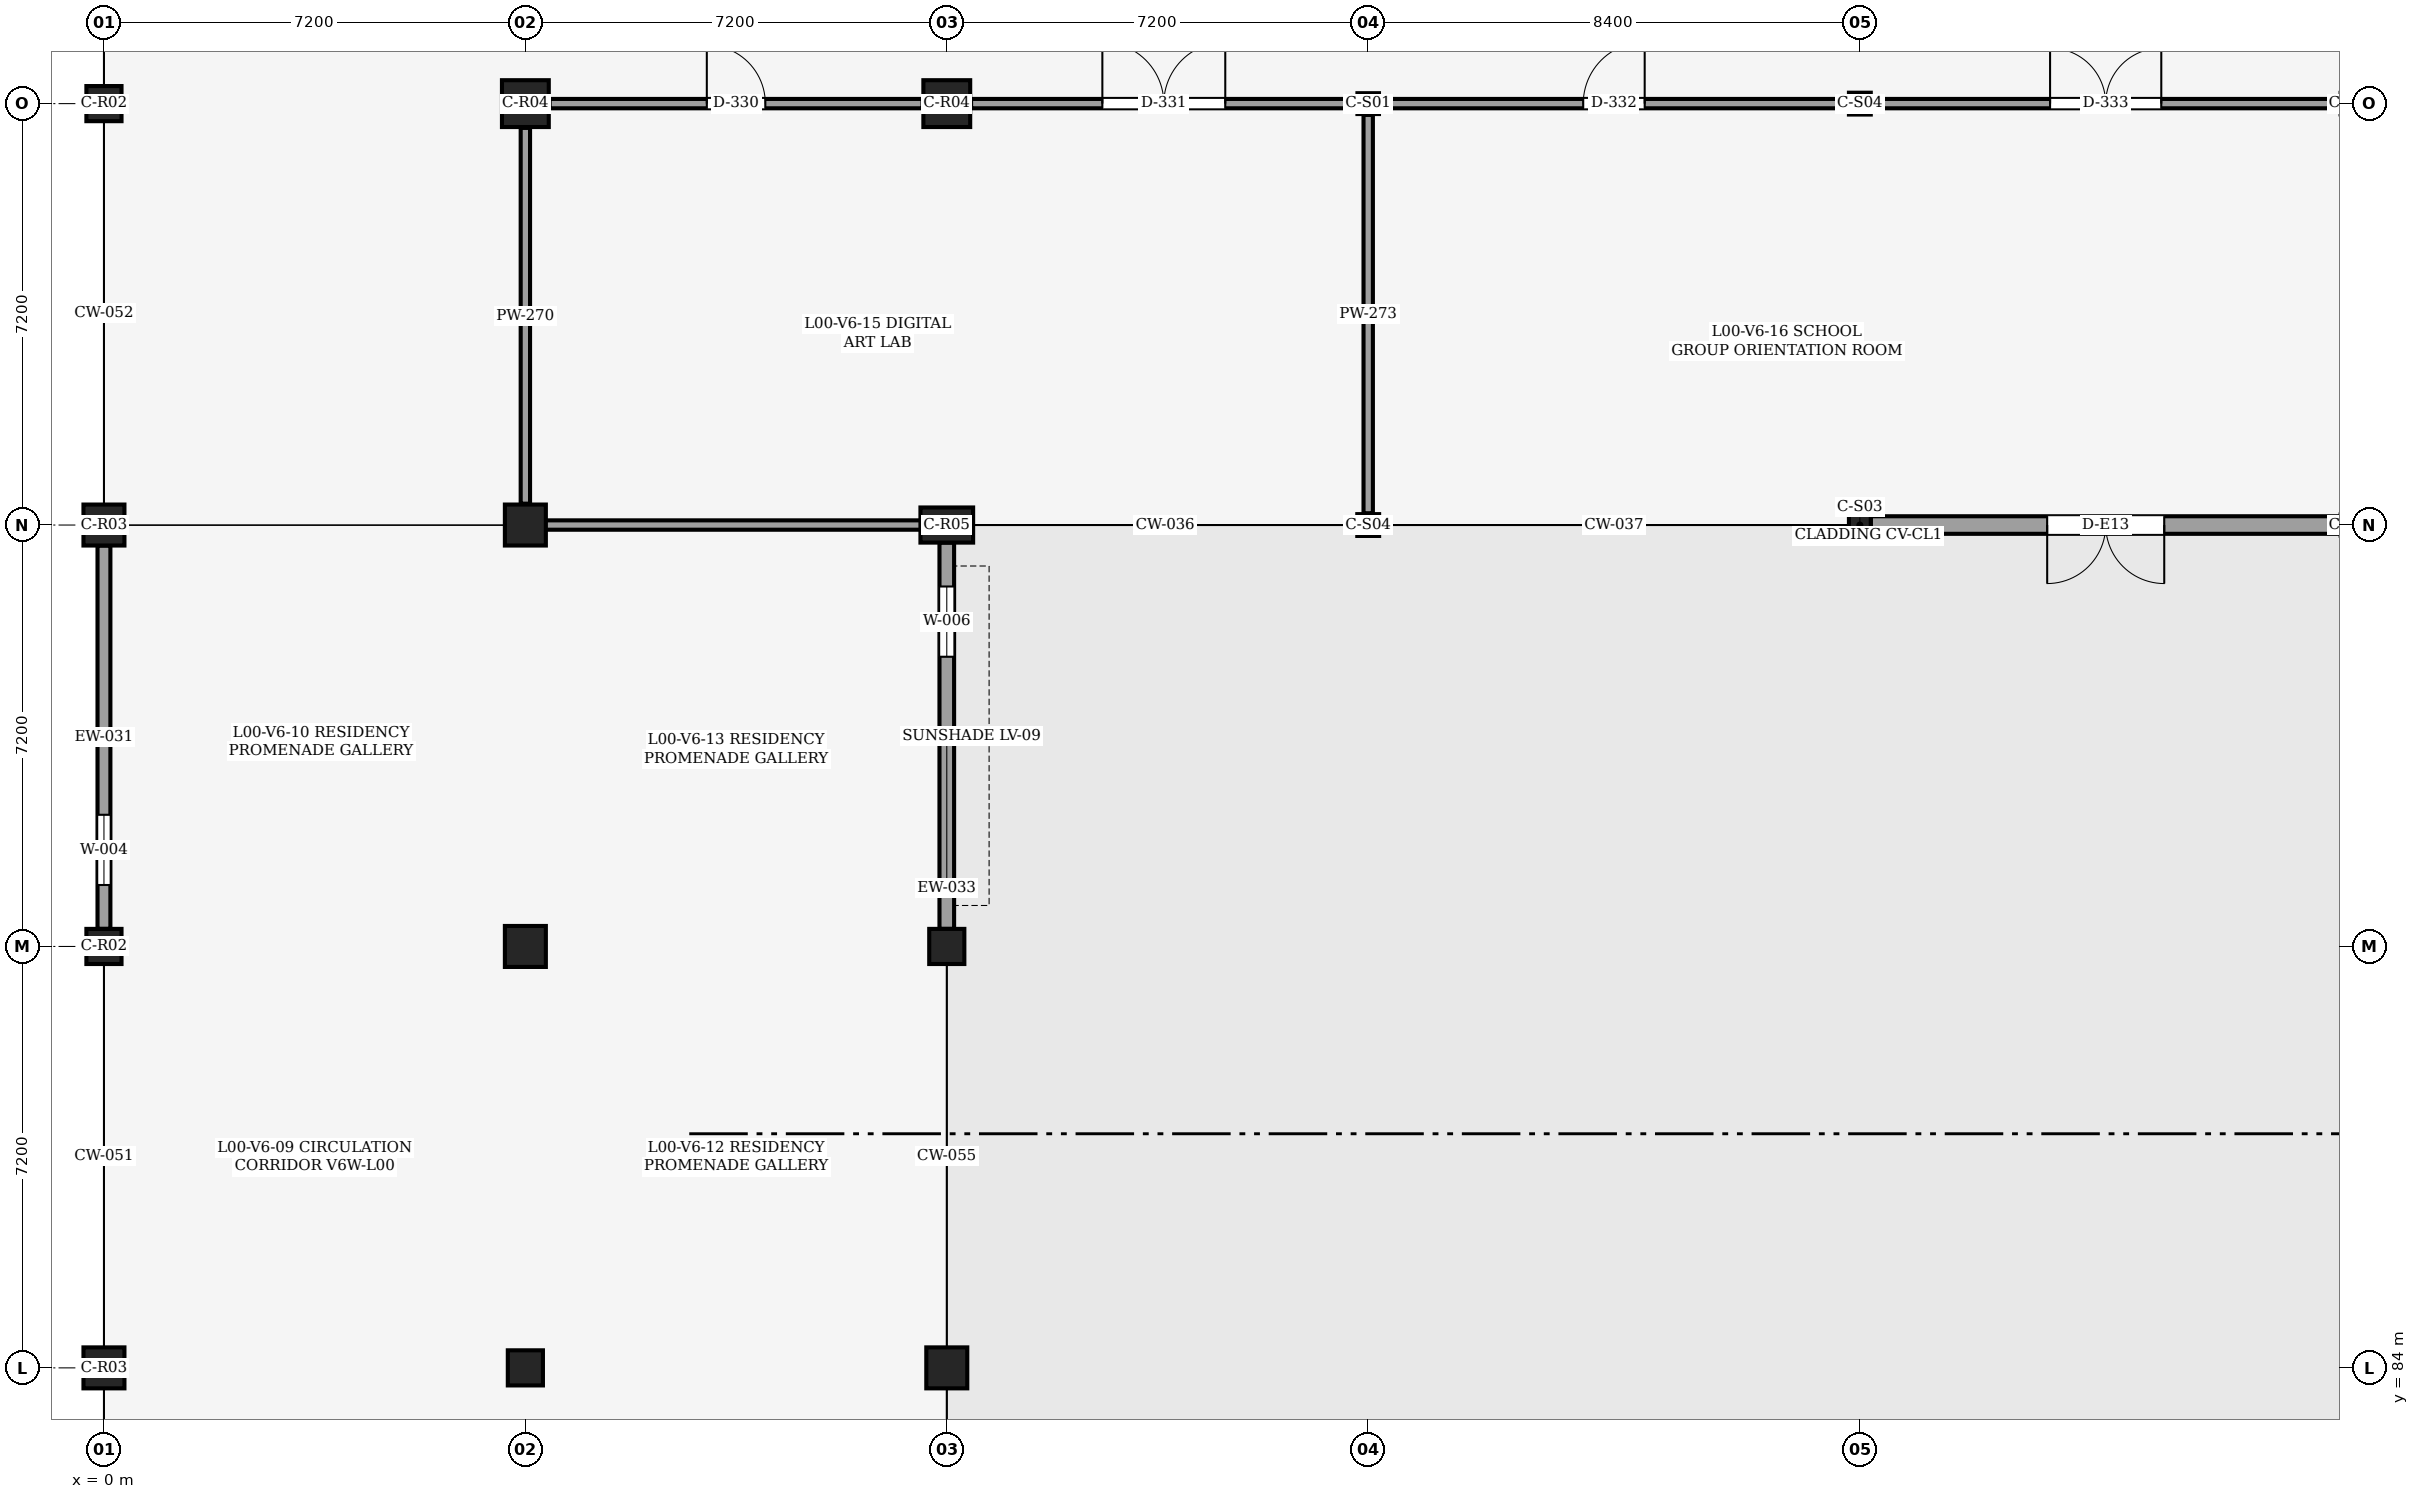
"""IFC4 building model, lengths in metres.
Left out: names, types, materials, properties, quantities, classifications, styles, units other than length and angle.
Written with IfcOpenShell. Run it as: python <this file> out.ifc"""

import sys

from ifc_helpers import new_model, si_unit, direction, frame, frame_2d, origin, origin_2d, place, context, subcontext, project, spatial, rectangle, i_section, extrude, element, fill, save


model = new_model("IFC4")
c1 = context("Model", 3, precision=1e-05, world=origin(), true_north=direction((0.0, 1.0)))
c2 = subcontext(c1, "Body", "Model", "MODEL_VIEW")
j1 = project(units=[si_unit("LENGTHUNIT", "METRE"), si_unit("PLANEANGLEUNIT", "RADIAN")], contexts=[c1])
p1 = place(None, origin())
s1 = spatial("IfcSite", under=j1, at=p1, CompositionType="ELEMENT")
p2 = place(p1, origin())
s2 = spatial("IfcBuilding", under=s1, at=p2, CompositionType="ELEMENT")
p3 = place(p2, origin())
s3 = spatial("IfcBuildingStorey", under=s2, at=p3, CompositionType="ELEMENT", Elevation=0.0)
p4 = place(p3, frame((0.0, 84.0, 0.0), z_axis=(0.0, 0.0, 1.0), x_axis=(1.0, 0.0, 0.0)))
e1 = element("IfcColumn", 1, at=p4, inside=s3, PredefinedType="COLUMN", context=c2, shape_type="SweptSolid", body=[
    extrude(rectangle(XDim=0.7, YDim=0.7, at=origin_2d()), origin(), (0.0, 0.0, 1.0), 5.4),
])
p5 = place(p3, frame((0.0, 91.2, 0.0), z_axis=(0.0, 0.0, 1.0), x_axis=(1.0, 0.0, 0.0)))
e2 = element("IfcColumn", 2, at=p5, inside=s3, PredefinedType="COLUMN", context=c2, shape_type="SweptSolid", body=[
    extrude(rectangle(XDim=0.6, YDim=0.6, at=origin_2d()), origin(), (0.0, 0.0, 1.0), 5.4),
])
p6 = place(p3, frame((0.0, 98.4, 0.0), z_axis=(0.0, 0.0, 1.0), x_axis=(1.0, 0.0, 0.0)))
e3 = element("IfcColumn", 3, at=p6, inside=s3, PredefinedType="COLUMN", context=c2, shape_type="SweptSolid", body=[
    extrude(rectangle(XDim=0.7, YDim=0.7, at=origin_2d()), origin(), (0.0, 0.0, 1.0), 5.4),
])
for number, where, z_axis, x_axis in (
    (4, (0.0, 105.6, 0.0), (0.0, 0.0, 1.0), (1.0, 0.0, 0.0)),
    (5, (7.2, 84.0, 0.0), (0.0, 0.0, 1.0), (1.0, 0.0, 0.0)),
):
    element("IfcColumn", number, at=place(p3, frame(where, z_axis=z_axis, x_axis=x_axis)), inside=s3, PredefinedType="COLUMN", context=c2, shape_type="SweptSolid", body=[
        extrude(rectangle(XDim=0.6, YDim=0.6, at=origin_2d()), origin(), (0.0, 0.0, 1.0), 5.4),
    ])
for number, where, z_axis, x_axis in (
    (6, (7.2, 91.2, 0.0), (0.0, 0.0, 1.0), (1.0, 0.0, 0.0)),
    (7, (7.2, 98.4, 0.0), (0.0, 0.0, 1.0), (1.0, 0.0, 0.0)),
):
    element("IfcColumn", number, at=place(p3, frame(where, z_axis=z_axis, x_axis=x_axis)), inside=s3, PredefinedType="COLUMN", context=c2, shape_type="SweptSolid", body=[
        extrude(rectangle(XDim=0.7, YDim=0.7, at=origin_2d()), origin(), (0.0, 0.0, 1.0), 5.4),
    ])
p7 = place(p3, frame((7.2, 105.6, 0.0), z_axis=(0.0, 0.0, 1.0), x_axis=(1.0, 0.0, 0.0)))
e8 = element("IfcColumn", 8, at=p7, inside=s3, PredefinedType="COLUMN", context=c2, shape_type="SweptSolid", body=[
    extrude(rectangle(XDim=0.8, YDim=0.8, at=origin_2d()), origin(), (0.0, 0.0, 1.0), 5.4),
])
p8 = place(p3, frame((14.4, 84.0, 0.0), z_axis=(0.0, 0.0, 1.0), x_axis=(1.0, 0.0, 0.0)))
e9 = element("IfcColumn", 9, at=p8, inside=s3, PredefinedType="COLUMN", context=c2, shape_type="SweptSolid", body=[
    extrude(rectangle(XDim=0.7, YDim=0.7, at=origin_2d()), origin(), (0.0, 0.0, 1.0), 5.4),
])
p9 = place(p3, frame((14.4, 91.2, 0.0), z_axis=(0.0, 0.0, 1.0), x_axis=(1.0, 0.0, 0.0)))
e10 = element("IfcColumn", 10, at=p9, inside=s3, PredefinedType="COLUMN", context=c2, shape_type="SweptSolid", body=[
    extrude(rectangle(XDim=0.6, YDim=0.6, at=origin_2d()), origin(), (0.0, 0.0, 1.0), 5.4),
])
p10 = place(p3, frame((14.4, 98.4, 0.0), z_axis=(0.0, 0.0, 1.0), x_axis=(1.0, 0.0, 0.0)))
e11 = element("IfcColumn", 11, at=p10, inside=s3, PredefinedType="COLUMN", context=c2, shape_type="SweptSolid", body=[
    extrude(rectangle(XDim=0.9, YDim=0.6, at=origin_2d()), origin(), (0.0, 0.0, 1.0), 5.4),
])
p11 = place(p3, frame((14.4, 105.6, 0.0), z_axis=(0.0, 0.0, 1.0), x_axis=(1.0, 0.0, 0.0)))
e12 = element("IfcColumn", 12, at=p11, inside=s3, PredefinedType="COLUMN", context=c2, shape_type="SweptSolid", body=[
    extrude(rectangle(XDim=0.8, YDim=0.8, at=origin_2d()), origin(), (0.0, 0.0, 1.0), 5.4),
])
p12 = place(p3, frame((21.6, 98.4, 0.0), z_axis=(0.0, 0.0, 1.0), x_axis=(1.0, 0.0, 0.0)))
e13 = element("IfcColumn", 13, at=p12, inside=s3, PredefinedType="COLUMN", context=c2, shape_type="SweptSolid", body=[
    extrude(i_section(OverallWidth=0.373, OverallDepth=0.373, WebThickness=0.016, FlangeThickness=0.026, FilletRadius=0.025, at=origin_2d()), origin(), (0.0, 0.0, 1.0), 5.4),
])
p13 = place(p3, frame((21.6, 105.6, 0.0), z_axis=(0.0, 0.0, 1.0), x_axis=(1.0, 0.0, 0.0)))
e14 = element("IfcColumn", 14, at=p13, inside=s3, PredefinedType="COLUMN", context=c2, shape_type="SweptSolid", body=[
    extrude(i_section(OverallWidth=0.368, OverallDepth=0.356, WebThickness=0.011, FlangeThickness=0.018, FilletRadius=0.025, at=origin_2d()), origin(), (0.0, 0.0, 1.0), 5.4),
])
p14 = place(p3, frame((30.0, 98.4, 0.0), z_axis=(0.0, 0.0, 1.0), x_axis=(1.0, 0.0, 0.0)))
e15 = element("IfcColumn", 15, at=p14, inside=s3, PredefinedType="COLUMN", context=c2, shape_type="SweptSolid", body=[
    extrude(i_section(OverallWidth=0.373, OverallDepth=0.368, WebThickness=0.015, FlangeThickness=0.024, FilletRadius=0.025, at=origin_2d()), origin(), (0.0, 0.0, 1.0), 5.4),
])
p15 = place(p3, frame((30.0, 105.6, 0.0), z_axis=(0.0, 0.0, 1.0), x_axis=(1.0, 0.0, 0.0)))
e16 = element("IfcColumn", 16, at=p15, inside=s3, PredefinedType="COLUMN", context=c2, shape_type="SweptSolid", body=[
    extrude(i_section(OverallWidth=0.373, OverallDepth=0.373, WebThickness=0.016, FlangeThickness=0.026, FilletRadius=0.025, at=origin_2d()), origin(), (0.0, 0.0, 1.0), 5.4),
])
p16 = place(p3, frame((38.215, 98.4, 0.0), z_axis=(0.0, 0.0, 1.0), x_axis=(-1.0, 0.0, 0.0)))
e17 = element("IfcWall", 17, at=p16, inside=s3, PredefinedType="SOLIDWALL", context=c2, shape_type="SweptSolid", body=[
    extrude(rectangle(XDim=8.028, YDim=0.3, at=frame_2d((4.014, 0.0))), origin(), (0.0, 0.0, 1.0), 4.378),
])
p17 = place(p16, frame((3.014, 0.0, 0.0)))
e18 = element("IfcOpeningElement", 18, at=p17, cuts=e17, PredefinedType="OPENING", context=c2, shape_type="SweptSolid", body=[
    extrude(rectangle(XDim=2.0, YDim=2.25, at=frame_2d((1.0, 1.125))), frame((0.0, 0.16, 0.0), z_axis=(0.0, -1.0, 0.0), x_axis=(1.0, 0.0, 0.0)), (0.0, 0.0, 1.0), 0.321),
])
p18 = place(p3, frame((0.0, 91.5, 0.0), z_axis=(0.0, 0.0, 1.0), x_axis=(0.0, 1.0, 0.0)))
e19 = element("IfcWall", 19, at=p18, inside=s3, PredefinedType="SOLIDWALL", context=c2, shape_type="SweptSolid", body=[
    extrude(rectangle(XDim=6.55, YDim=0.22, at=frame_2d((3.275, 0.0))), origin(), (0.0, 0.0, 1.0), 4.607),
])
p19 = place(p18, frame((0.75, 0.0, 0.9)))
e20 = element("IfcOpeningElement", 20, at=p19, cuts=e19, PredefinedType="OPENING", context=c2, shape_type="SweptSolid", body=[
    extrude(rectangle(XDim=1.2, YDim=1.5, at=frame_2d((0.6, 0.75))), frame((0.0, 0.12, 0.0), z_axis=(0.0, -1.0, 0.0), x_axis=(1.0, 0.0, 0.0)), (0.0, 0.0, 1.0), 0.24),
])
p20 = place(p3, frame((14.4, 98.1, 0.0), z_axis=(0.0, 0.0, 1.0), x_axis=(0.0, -1.0, 0.0)))
e21 = element("IfcWall", 21, at=p20, inside=s3, PredefinedType="SOLIDWALL", context=c2, shape_type="SweptSolid", body=[
    extrude(rectangle(XDim=6.6, YDim=0.25, at=frame_2d((3.3, 0.0))), origin(), (0.0, 0.0, 1.0), 4.528),
])
p21 = place(p20, frame((0.75, 0.0, 0.9)))
e22 = element("IfcOpeningElement", 22, at=p21, cuts=e21, PredefinedType="OPENING", context=c2, shape_type="SweptSolid", body=[
    extrude(rectangle(XDim=1.2, YDim=1.5, at=frame_2d((0.6, 0.75))), frame((0.0, 0.135, 0.0), z_axis=(0.0, -1.0, 0.0), x_axis=(1.0, 0.0, 0.0)), (0.0, 0.0, 1.0), 0.271),
])
p22 = place(p3, frame((7.2, 98.765, 0.0), z_axis=(0.0, 0.0, 1.0), x_axis=(0.0, 1.0, 0.0)))
e23 = element("IfcWall", 23, at=p22, inside=s3, PredefinedType="PARTITIONING", context=c2, shape_type="SweptSolid", body=[
    extrude(rectangle(XDim=6.42, YDim=0.16, at=frame_2d((3.21, 0.0))), origin(), (0.0, 0.0, 1.0), 4.528),
])
p23 = place(p3, frame((7.615, 105.6, 0.0), z_axis=(0.0, 0.0, 1.0), x_axis=(1.0, 0.0, 0.0)))
e24 = element("IfcWall", 24, at=p23, inside=s3, PredefinedType="PARTITIONING", context=c2, shape_type="SweptSolid", body=[
    extrude(rectangle(XDim=6.37, YDim=0.16, at=frame_2d((3.185, 0.0))), origin(), (0.0, 0.0, 1.0), 4.591),
])
p24 = place(p23, frame((2.685, 0.0, 0.0)))
e25 = element("IfcOpeningElement", 25, at=p24, cuts=e24, PredefinedType="OPENING", context=c2, shape_type="SweptSolid", body=[
    extrude(rectangle(XDim=1.0, YDim=2.15, at=frame_2d((0.5, 1.075))), frame((0.0, 0.09, 0.0), z_axis=(0.0, -1.0, 0.0), x_axis=(1.0, 0.0, 0.0)), (0.0, 0.0, 1.0), 0.18),
])
p25 = place(p3, frame((14.815, 105.6, 0.0), z_axis=(0.0, 0.0, 1.0), x_axis=(1.0, 0.0, 0.0)))
e26 = element("IfcWall", 26, at=p25, inside=s3, PredefinedType="PARTITIONING", context=c2, shape_type="SweptSolid", body=[
    extrude(rectangle(XDim=6.586, YDim=0.16, at=frame_2d((3.293, 0.0))), origin(), (0.0, 0.0, 1.0), 4.607),
])
p26 = place(p25, frame((2.243, 0.0, 0.0)))
e27 = element("IfcOpeningElement", 27, at=p26, cuts=e26, PredefinedType="OPENING", context=c2, shape_type="SweptSolid", body=[
    extrude(rectangle(XDim=2.1, YDim=2.5, at=frame_2d((1.05, 1.25))), frame((0.0, 0.09, 0.0), z_axis=(0.0, -1.0, 0.0), x_axis=(1.0, 0.0, 0.0)), (0.0, 0.0, 1.0), 0.18),
])
p27 = place(p3, frame((21.6, 98.602, 0.0), z_axis=(0.0, 0.0, 1.0), x_axis=(0.0, 1.0, 0.0)))
e28 = element("IfcWall", 28, at=p27, inside=s3, PredefinedType="PARTITIONING", context=c2, shape_type="SweptSolid", body=[
    extrude(rectangle(XDim=6.805, YDim=0.16, at=frame_2d((3.403, 0.0))), origin(), (0.0, 0.0, 1.0), 4.607),
])
p28 = place(p3, frame((21.799, 105.6, 0.0), z_axis=(0.0, 0.0, 1.0), x_axis=(1.0, 0.0, 0.0)))
e29 = element("IfcWall", 29, at=p28, inside=s3, PredefinedType="PARTITIONING", context=c2, shape_type="SweptSolid", body=[
    extrude(rectangle(XDim=8.0, YDim=0.16, at=frame_2d((4.0, 0.0))), origin(), (0.0, 0.0, 1.0), 4.378),
])
p29 = place(p28, frame((3.475, 0.0, 0.0)))
e30 = element("IfcOpeningElement", 30, at=p29, cuts=e29, PredefinedType="OPENING", context=c2, shape_type="SweptSolid", body=[
    extrude(rectangle(XDim=1.05, YDim=2.15, at=frame_2d((0.525, 1.075))), frame((0.0, 0.09, 0.0), z_axis=(0.0, -1.0, 0.0), x_axis=(1.0, 0.0, 0.0)), (0.0, 0.0, 1.0), 0.18),
])
p30 = place(p3, frame((30.201, 105.6, 0.0), z_axis=(0.0, 0.0, 1.0), x_axis=(1.0, 0.0, 0.0)))
e31 = element("IfcWall", 31, at=p30, inside=s3, PredefinedType="PARTITIONING", context=c2, shape_type="SweptSolid", body=[
    extrude(rectangle(XDim=7.997, YDim=0.16, at=frame_2d((3.999, 0.0))), origin(), (0.0, 0.0, 1.0), 4.447),
])
p31 = place(p30, frame((3.049, 0.0, 0.0)))
e32 = element("IfcOpeningElement", 32, at=p31, cuts=e31, PredefinedType="OPENING", context=c2, shape_type="SweptSolid", body=[
    extrude(rectangle(XDim=1.9, YDim=2.45, at=frame_2d((0.95, 1.225))), frame((0.0, 0.09, 0.0), z_axis=(0.0, -1.0, 0.0), x_axis=(1.0, 0.0, 0.0)), (0.0, 0.0, 1.0), 0.18),
])
p32 = place(p3, frame((7.42, 98.4, 0.0), z_axis=(0.0, 0.0, 1.0), x_axis=(1.0, 0.0, 0.0)))
e33 = element("IfcWall", 33, at=p32, inside=s3, PredefinedType="PARTITIONING", context=c2, shape_type="SweptSolid", body=[
    extrude(rectangle(XDim=6.76, YDim=0.16, at=frame_2d((3.38, 0.0))), origin(), (0.0, 0.0, 1.0), 4.533),
])
p33 = place(p17, origin())
e34 = element("IfcDoor", 34, at=p33, inside=s3, OperationType="DOUBLE_DOOR_SINGLE_SWING", PredefinedType="DOOR", context=c2, shape_type="SweptSolid", body=[
    extrude(rectangle(XDim=2.0, YDim=2.25, at=frame_2d((1.0, 1.125))), frame((0.0, 0.025, 0.0), z_axis=(0.0, -1.0, 0.0), x_axis=(1.0, 0.0, 0.0)), (0.0, 0.0, 1.0), 0.05),
])
fill(e18, e34)
p34 = place(p19, origin())
e35 = element("IfcWindow", 35, at=p34, inside=s3, PartitioningType="SINGLE_PANEL", PredefinedType="WINDOW", context=c2, shape_type="SweptSolid", body=[
    extrude(rectangle(XDim=1.2, YDim=1.5, at=frame_2d((0.6, 0.75))), frame((0.0, 0.03, 0.0), z_axis=(0.0, -1.0, 0.0), x_axis=(1.0, 0.0, 0.0)), (0.0, 0.0, 1.0), 0.06),
])
fill(e20, e35)
p35 = place(p21, origin())
e36 = element("IfcWindow", 36, at=p35, inside=s3, PartitioningType="SINGLE_PANEL", PredefinedType="WINDOW", context=c2, shape_type="SweptSolid", body=[
    extrude(rectangle(XDim=1.2, YDim=1.5, at=frame_2d((0.6, 0.75))), frame((0.0, 0.03, 0.0), z_axis=(0.0, -1.0, 0.0), x_axis=(1.0, 0.0, 0.0)), (0.0, 0.0, 1.0), 0.06),
])
fill(e22, e36)
p36 = place(p24, origin())
e37 = element("IfcDoor", 37, at=p36, inside=s3, OperationType="SINGLE_SWING_LEFT", PredefinedType="DOOR", context=c2, shape_type="SweptSolid", body=[
    extrude(rectangle(XDim=1.0, YDim=2.15, at=frame_2d((0.5, 1.075))), frame((0.0, 0.025, 0.0), z_axis=(0.0, -1.0, 0.0), x_axis=(1.0, 0.0, 0.0)), (0.0, 0.0, 1.0), 0.05),
])
fill(e25, e37)
p37 = place(p26, origin())
e38 = element("IfcDoor", 38, at=p37, inside=s3, OperationType="DOUBLE_DOOR_SINGLE_SWING", PredefinedType="DOOR", context=c2, shape_type="SweptSolid", body=[
    extrude(rectangle(XDim=2.1, YDim=2.5, at=frame_2d((1.05, 1.25))), frame((0.0, 0.025, 0.0), z_axis=(0.0, -1.0, 0.0), x_axis=(1.0, 0.0, 0.0)), (0.0, 0.0, 1.0), 0.05),
])
fill(e27, e38)
p38 = place(p29, origin())
e39 = element("IfcDoor", 39, at=p38, inside=s3, OperationType="SINGLE_SWING_RIGHT", PredefinedType="DOOR", context=c2, shape_type="SweptSolid", body=[
    extrude(rectangle(XDim=1.05, YDim=2.15, at=frame_2d((0.525, 1.075))), frame((0.0, 0.025, 0.0), z_axis=(0.0, -1.0, 0.0), x_axis=(1.0, 0.0, 0.0)), (0.0, 0.0, 1.0), 0.05),
])
fill(e30, e39)
p39 = place(p31, origin())
e40 = element("IfcDoor", 40, at=p39, inside=s3, OperationType="DOUBLE_DOOR_SINGLE_SWING", PredefinedType="DOOR", context=c2, shape_type="SweptSolid", body=[
    extrude(rectangle(XDim=1.9, YDim=2.45, at=frame_2d((0.95, 1.225))), frame((0.0, 0.025, 0.0), z_axis=(0.0, -1.0, 0.0), x_axis=(1.0, 0.0, 0.0)), (0.0, 0.0, 1.0), 0.05),
])
fill(e32, e40)
save(model, sys.argv[1])
